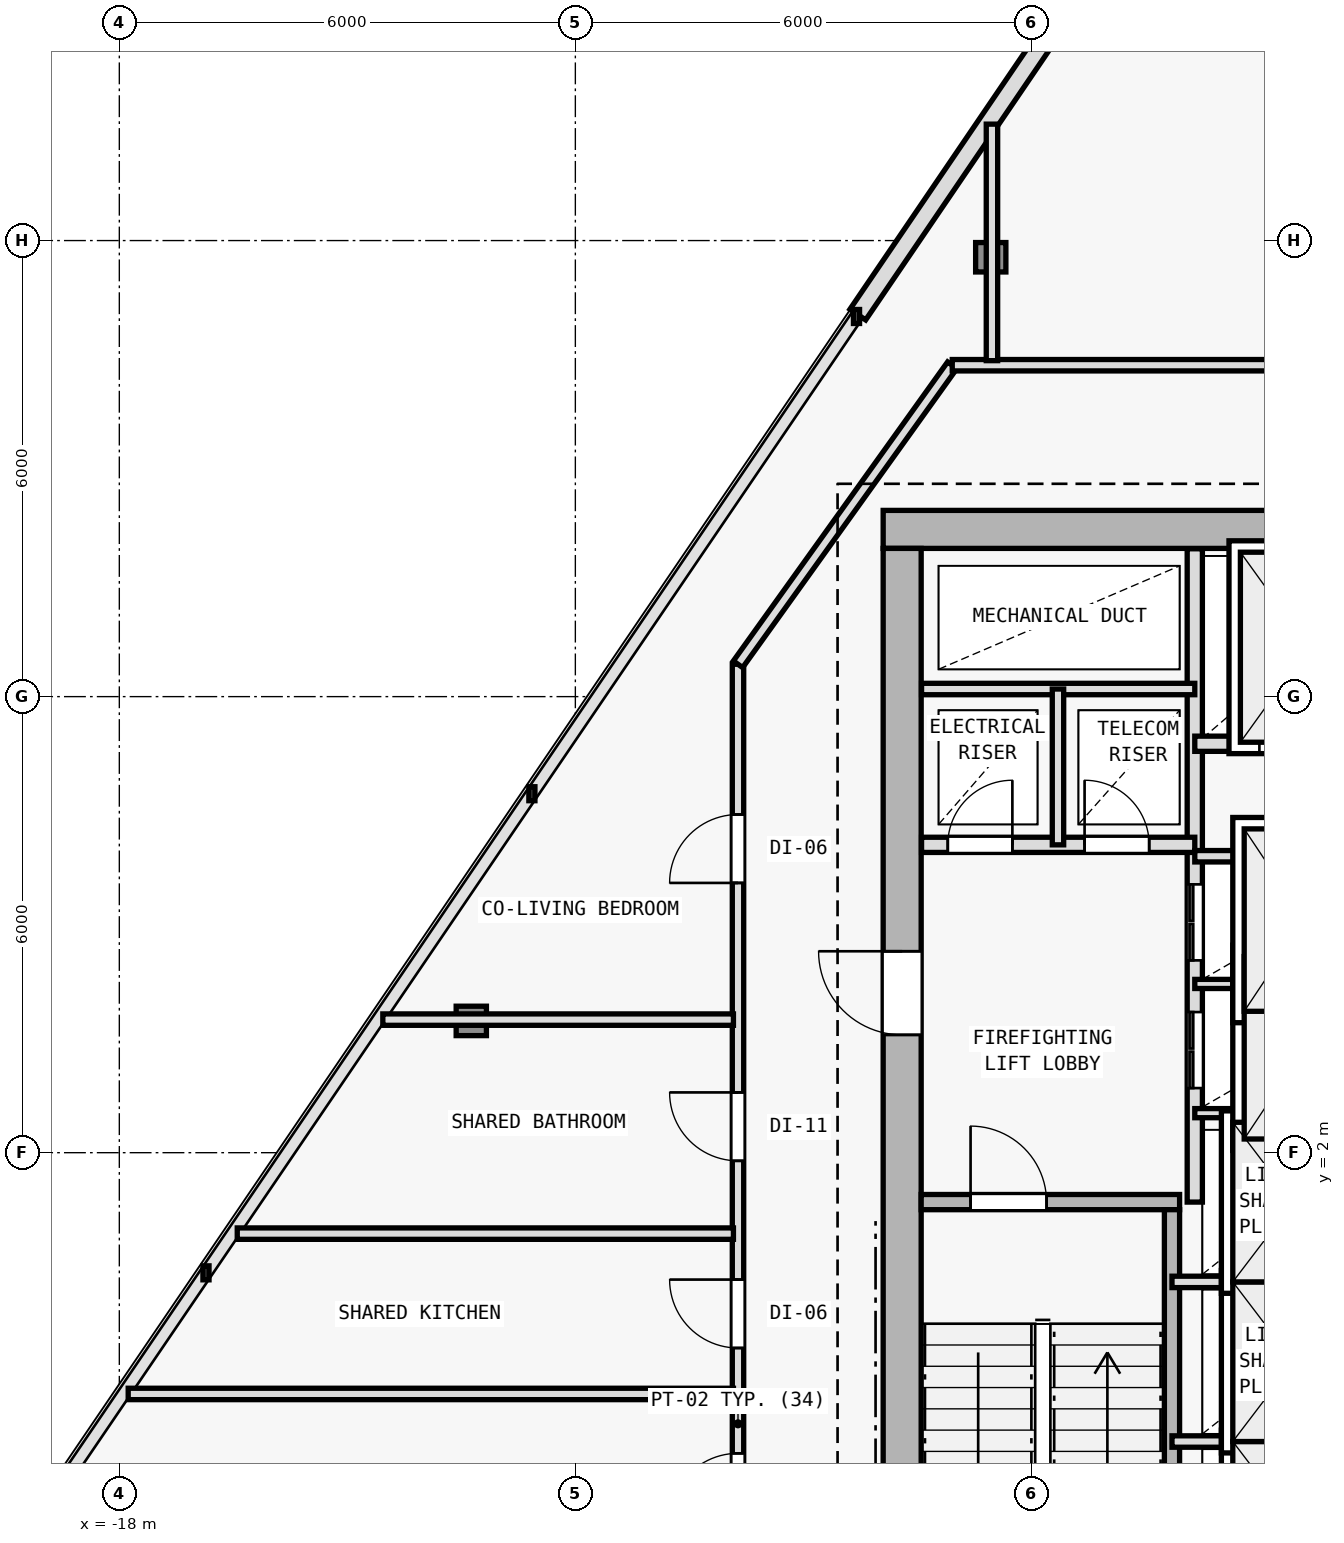
"""IFC4 building model, lengths in metres.
Left out: names, types, materials, properties, quantities, classifications, styles, units other than length and angle.
Written with IfcOpenShell. Run it as: python <this file> out.ifc"""

import sys

from ifc_helpers import new_model, si_unit, direction, frame, frame_2d, origin, origin_2d, place, context, subcontext, project, spatial, rectangle, i_section, extrude, element, fill, save


model = new_model("IFC4")
c1 = context("Model", 3, precision=1e-05, world=origin(), true_north=direction((0.0, 1.0)))
c2 = subcontext(c1, "Body", "Model", "MODEL_VIEW")
j1 = project(units=[si_unit("LENGTHUNIT", "METRE"), si_unit("PLANEANGLEUNIT", "RADIAN")], contexts=[c1])
p1 = place(None, origin())
s1 = spatial("IfcSite", under=j1, at=p1, CompositionType="ELEMENT")
p2 = place(p1, origin())
s2 = spatial("IfcBuilding", under=s1, at=p2, CompositionType="ELEMENT")
p3 = place(p2, frame((0.0, 0.0, 198.3)))
s3 = spatial("IfcBuildingStorey", under=s2, at=p3, CompositionType="ELEMENT", Elevation=198.3)
for number, where, z_axis, x_axis in (
    (1, (-7.7, 10.2, 0.0), (0.0, 0.0, 1.0), (1.0, 0.0, 0.0)),
    (2, (-7.7, 2.0, 0.0), (0.0, 0.0, 1.0), (1.0, 0.0, 0.0)),
):
    element("IfcColumn", number, at=place(p3, frame(where, z_axis=z_axis, x_axis=x_axis)), inside=s3, PredefinedType="COLUMN", context=c2, shape_type="SweptSolid", body=[
        extrude(i_section(OverallWidth=0.398, OverallDepth=0.387, WebThickness=0.013, FlangeThickness=0.022, FilletRadius=0.015, at=origin_2d()), origin(), (0.0, 0.0, 1.0), 3.6),
    ])
p4 = place(p3, frame((-6.534, 13.781, 0.005), z_axis=(0.008774546149, -0.002584750028, 0.999958162328), x_axis=(0.282568886397, 0.959247009086, 0.0)))
e3 = element("IfcColumn", 3, at=p4, inside=s3, PredefinedType="COLUMN", context=c2, shape_type="SweptSolid", body=[
    extrude(i_section(OverallWidth=0.398, OverallDepth=0.387, WebThickness=0.013, FlangeThickness=0.022, FilletRadius=0.015, at=origin_2d()), origin(), (0.0, 0.0, 1.0), 3.589),
])
p5 = place(p3, frame((-13.369, 3.734, 0.005), z_axis=(0.01700241672, 0.009521353363, 0.999810112799), x_axis=(-0.488603368932, 0.87250601595, 0.0)))
e4 = element("IfcColumn", 4, at=p5, inside=s3, PredefinedType="COLUMN", context=c2, shape_type="SweptSolid", body=[
    extrude(i_section(OverallWidth=0.398, OverallDepth=0.387, WebThickness=0.013, FlangeThickness=0.022, FilletRadius=0.015, at=origin_2d()), origin(), (0.0, 0.0, 1.0), 3.59),
])
p6 = place(p3, frame((-8.284, 13.026, 0.0), z_axis=(0.0, 0.0, 1.0), x_axis=(0.562468945091, 0.826818411629, 0.0)))
e5 = element("IfcWall", 5, at=p6, inside=s3, PredefinedType="SOLIDWALL", context=c2, shape_type="SweptSolid", body=[
    extrude(rectangle(XDim=10.714, YDim=0.25, at=frame_2d((5.357, 0.0))), origin(), (0.0, 0.0, 1.0), 3.35),
])
p7 = place(p6, frame((4.607, 0.0, 0.62)))
e6 = element("IfcOpeningElement", 6, at=p7, cuts=e5, PredefinedType="OPENING", context=c2, shape_type="SweptSolid", body=[
    extrude(rectangle(XDim=1.5, YDim=2.0, at=frame_2d((0.75, 1.0))), frame((0.0, 0.135, 0.0), z_axis=(0.0, -1.0, 0.0), x_axis=(1.0, 0.0, 0.0)), (0.0, 0.0, 1.0), 0.27),
])
p8 = place(p3, frame((7.95, 10.2, 0.0), z_axis=(0.0, 0.0, 1.0), x_axis=(-1.0, 0.0, 0.0)))
e7 = element("IfcWall", 7, at=p8, inside=s3, PredefinedType="SHEAR", context=c2, shape_type="SweptSolid", body=[
    extrude(rectangle(XDim=15.9, YDim=0.5, at=frame_2d((7.95, 0.0))), origin(), (0.0, 0.0, 1.0), 3.35),
])
p9 = place(p8, frame((4.4, 0.0, 0.0)))
e8 = element("IfcOpeningElement", 8, at=p9, cuts=e7, PredefinedType="OPENING", context=c2, shape_type="SweptSolid", body=[
    extrude(rectangle(XDim=1.1, YDim=2.15, at=frame_2d((0.55, 1.075))), frame((0.0, 0.26, 0.0), z_axis=(0.0, -1.0, 0.0), x_axis=(1.0, 0.0, 0.0)), (0.0, 0.0, 1.0), 0.52),
])
p10 = place(p3, frame((-7.7, -9.15, 0.0), z_axis=(0.0, 0.0, 1.0), x_axis=(0.0, 1.0, 0.0)))
e9 = element("IfcWall", 9, at=p10, inside=s3, PredefinedType="SHEAR", context=c2, shape_type="SweptSolid", body=[
    extrude(rectangle(XDim=19.1, YDim=0.5, at=frame_2d((9.55, 0.0))), origin(), (0.0, 0.0, 1.0), 3.35),
])
p11 = place(p10, frame((12.7, 0.0, 0.0)))
e10 = element("IfcOpeningElement", 10, at=p11, cuts=e9, PredefinedType="OPENING", context=c2, shape_type="SweptSolid", body=[
    extrude(rectangle(XDim=1.1, YDim=2.15, at=frame_2d((0.55, 1.075))), frame((0.0, 0.26, 0.0), z_axis=(0.0, -1.0, 0.0), x_axis=(1.0, 0.0, 0.0)), (0.0, 0.0, 1.0), 0.52),
])
p12 = place(p3, frame((-7.45, 1.35, 0.0), z_axis=(0.0, 0.0, 1.0), x_axis=(1.0, 0.0, 0.0)))
e11 = element("IfcWall", 11, at=p12, inside=s3, PredefinedType="SOLIDWALL", context=c2, shape_type="SweptSolid", body=[
    extrude(rectangle(XDim=3.4, YDim=0.2, at=frame_2d((1.7, 0.0))), origin(), (0.0, 0.0, 1.0), 3.35),
])
p13 = place(p12, frame((0.65, 0.0, 0.0)))
e12 = element("IfcOpeningElement", 12, at=p13, cuts=e11, PredefinedType="OPENING", context=c2, shape_type="SweptSolid", body=[
    extrude(rectangle(XDim=1.0, YDim=2.15, at=frame_2d((0.5, 1.075))), frame((0.0, 0.11, 0.0), z_axis=(0.0, -1.0, 0.0), x_axis=(1.0, 0.0, 0.0)), (0.0, 0.0, 1.0), 0.22),
])
p14 = place(p3, frame((-4.15, -5.95, 0.0), z_axis=(0.0, 0.0, 1.0), x_axis=(0.0, 1.0, 0.0)))
e13 = element("IfcWall", 13, at=p14, inside=s3, PredefinedType="SOLIDWALL", context=c2, shape_type="SweptSolid", body=[
    extrude(rectangle(XDim=7.2, YDim=0.2, at=frame_2d((3.6, 0.0))), origin(), (0.0, 0.0, 1.0), 3.35),
])
p15 = place(p3, frame((-3.85, 1.35, 0.0), z_axis=(0.0, 0.0, 1.0), x_axis=(0.0, 1.0, 0.0)))
e14 = element("IfcWall", 14, at=p15, inside=s3, PredefinedType="SOLIDWALL", context=c2, shape_type="SweptSolid", body=[
    extrude(rectangle(XDim=8.595, YDim=0.2, at=frame_2d((4.297, 0.0))), origin(), (0.0, 0.0, 1.0), 3.35),
])
p16 = place(p15, frame((1.5, 0.0, 0.0)))
e15 = element("IfcOpeningElement", 15, at=p16, cuts=e14, PredefinedType="OPENING", context=c2, shape_type="SweptSolid", body=[
    extrude(rectangle(XDim=1.0, YDim=2.15, at=frame_2d((0.5, 1.075))), frame((0.0, 0.11, 0.0), z_axis=(0.0, -1.0, 0.0), x_axis=(1.0, 0.0, 0.0)), (0.0, 0.0, 1.0), 0.22),
])
p17 = place(p15, frame((3.18, 0.0, 0.0)))
e16 = element("IfcOpeningElement", 16, at=p17, cuts=e14, PredefinedType="OPENING", context=c2, shape_type="SweptSolid", body=[
    extrude(rectangle(XDim=1.0, YDim=2.15, at=frame_2d((0.5, 1.075))), frame((0.0, 0.11, 0.0), z_axis=(0.0, -1.0, 0.0), x_axis=(1.0, 0.0, 0.0)), (0.0, 0.0, 1.0), 0.22),
])
p18 = place(p3, frame((-7.445, 6.05, 0.0), z_axis=(0.0, 0.0, 1.0), x_axis=(1.0, 0.0, 0.0)))
e17 = element("IfcWall", 17, at=p18, inside=s3, PredefinedType="SOLIDWALL", context=c2, shape_type="SweptSolid", body=[
    extrude(rectangle(XDim=3.595, YDim=0.2, at=frame_2d((1.797, 0.0))), origin(), (0.0, 0.0, 1.0), 3.35),
])
p19 = place(p18, frame((0.345, 0.0, 0.0)))
e18 = element("IfcOpeningElement", 18, at=p19, cuts=e17, PredefinedType="OPENING", context=c2, shape_type="SweptSolid", body=[
    extrude(rectangle(XDim=0.85, YDim=2.1, at=frame_2d((0.425, 1.05))), frame((0.0, 0.11, 0.0), z_axis=(0.0, -1.0, 0.0), x_axis=(1.0, 0.0, 0.0)), (0.0, 0.0, 1.0), 0.22),
])
p20 = place(p18, frame((2.145, 0.0, 0.0)))
e19 = element("IfcOpeningElement", 19, at=p20, cuts=e17, PredefinedType="OPENING", context=c2, shape_type="SweptSolid", body=[
    extrude(rectangle(XDim=0.85, YDim=2.1, at=frame_2d((0.425, 1.05))), frame((0.0, 0.11, 0.0), z_axis=(0.0, -1.0, 0.0), x_axis=(1.0, 0.0, 0.0)), (0.0, 0.0, 1.0), 0.22),
])
p21 = place(p3, frame((-7.445, 8.1, 0.0), z_axis=(0.0, 0.0, 1.0), x_axis=(1.0, 0.0, 0.0)))
e20 = element("IfcWall", 20, at=p21, inside=s3, PredefinedType="PARTITIONING", context=c2, shape_type="SweptSolid", body=[
    extrude(rectangle(XDim=3.595, YDim=0.15, at=frame_2d((1.797, 0.0))), origin(), (0.0, 0.0, 1.0), 3.35),
])
p22 = place(p3, frame((-5.65, 6.05, 0.0), z_axis=(0.0, 0.0, 1.0), x_axis=(0.0, 1.0, 0.0)))
e21 = element("IfcWall", 21, at=p22, inside=s3, PredefinedType="PARTITIONING", context=c2, shape_type="SweptSolid", body=[
    extrude(rectangle(XDim=2.05, YDim=0.15, at=frame_2d((1.025, 0.0))), origin(), (0.0, 0.0, 1.0), 3.35),
])
for number, where, z_axis, x_axis in (
    (22, (-3.85, 2.52, 0.0), (0.0, 0.0, 1.0), (1.0, 0.0, 0.0)),
    (23, (-3.85, 4.22, 0.0), (0.0, 0.0, 1.0), (1.0, 0.0, 0.0)),
):
    element("IfcWall", number, at=place(p3, frame(where, z_axis=z_axis, x_axis=x_axis)), inside=s3, PredefinedType="PARTITIONING", context=c2, shape_type="SweptSolid", body=[
        extrude(rectangle(XDim=2.9, YDim=0.12, at=frame_2d((1.45, 0.0))), origin(), (0.0, 0.0, 1.0), 3.35),
    ])
p23 = place(p3, frame((-3.85, 5.9, 0.0), z_axis=(0.0, 0.0, 1.0), x_axis=(1.0, 0.0, 0.0)))
e24 = element("IfcWall", 24, at=p23, inside=s3, PredefinedType="PARTITIONING", context=c2, shape_type="SweptSolid", body=[
    extrude(rectangle(XDim=2.9, YDim=0.15, at=frame_2d((1.45, 0.0))), origin(), (0.0, 0.0, 1.0), 3.35),
])
p24 = place(p3, frame((-3.85, 7.38, 0.0), z_axis=(0.0, 0.0, 1.0), x_axis=(1.0, 0.0, 0.0)))
e25 = element("IfcWall", 25, at=p24, inside=s3, PredefinedType="SOLIDWALL", context=c2, shape_type="SweptSolid", body=[
    extrude(rectangle(XDim=2.9, YDim=0.2, at=frame_2d((1.45, 0.0))), origin(), (0.0, 0.0, 1.0), 3.35),
])
p25 = place(p24, frame((0.85, 0.0, 0.0)))
e26 = element("IfcOpeningElement", 26, at=p25, cuts=e25, PredefinedType="OPENING", context=c2, shape_type="SweptSolid", body=[
    extrude(rectangle(XDim=1.2, YDim=2.2, at=frame_2d((0.6, 1.1))), frame((0.0, 0.11, 0.0), z_axis=(0.0, -1.0, 0.0), x_axis=(1.0, 0.0, 0.0)), (0.0, 0.0, 1.0), 0.22),
])
for number, where, z_axis, x_axis in (
    (27, (-4.15, -1.8, 0.0), (0.0, 0.0, 1.0), (1.0, 0.0, 0.0)),
    (28, (-4.15, 0.3, 0.0), (0.0, 0.0, 1.0), (1.0, 0.0, 0.0)),
):
    element("IfcWall", number, at=place(p3, frame(where, z_axis=z_axis, x_axis=x_axis)), inside=s3, PredefinedType="PARTITIONING", context=c2, shape_type="SweptSolid", body=[
        extrude(rectangle(XDim=2.9, YDim=0.15, at=frame_2d((1.45, 0.0))), origin(), (0.0, 0.0, 1.0), 3.35),
    ])
p26 = place(p3, frame((-9.86, -11.56, 0.0), z_axis=(0.0, 0.0, 1.0), x_axis=(0.0, 1.0, 0.0)))
e29 = element("IfcWall", 29, at=p26, inside=s3, PredefinedType="PARTITIONING", context=c2, shape_type="SweptSolid", body=[
    extrude(rectangle(XDim=19.986, YDim=0.15, at=frame_2d((9.993, 0.0))), origin(), (0.0, 0.0, 1.0), 2.725),
])
p27 = place(p26, frame((10.99, 0.0, 0.0)))
e30 = element("IfcOpeningElement", 30, at=p27, cuts=e29, PredefinedType="OPENING", context=c2, shape_type="SweptSolid", body=[
    extrude(rectangle(XDim=0.9, YDim=2.1, at=frame_2d((0.45, 1.05))), frame((0.0, 0.085, 0.0), z_axis=(0.0, -1.0, 0.0), x_axis=(1.0, 0.0, 0.0)), (0.0, 0.0, 1.0), 0.17),
])
p28 = place(p26, frame((8.705, 0.0, 0.0)))
e31 = element("IfcOpeningElement", 31, at=p28, cuts=e29, PredefinedType="OPENING", context=c2, shape_type="SweptSolid", body=[
    extrude(rectangle(XDim=0.9, YDim=2.1, at=frame_2d((0.45, 1.05))), frame((0.0, 0.085, 0.0), z_axis=(0.0, -1.0, 0.0), x_axis=(1.0, 0.0, 0.0)), (0.0, 0.0, 1.0), 0.17),
])
p29 = place(p26, frame((6.155, 0.0, 0.0)))
e32 = element("IfcOpeningElement", 32, at=p29, cuts=e29, PredefinedType="OPENING", context=c2, shape_type="SweptSolid", body=[
    extrude(rectangle(XDim=0.9, YDim=2.1, at=frame_2d((0.45, 1.05))), frame((0.0, 0.085, 0.0), z_axis=(0.0, -1.0, 0.0), x_axis=(1.0, 0.0, 0.0)), (0.0, 0.0, 1.0), 0.17),
])
p30 = place(p26, frame((2.282, 0.0, 0.0)))
e33 = element("IfcOpeningElement", 33, at=p30, cuts=e29, PredefinedType="OPENING", context=c2, shape_type="SweptSolid", body=[
    extrude(rectangle(XDim=0.9, YDim=2.1, at=frame_2d((0.45, 1.05))), frame((0.0, 0.085, 0.0), z_axis=(0.0, -1.0, 0.0), x_axis=(1.0, 0.0, 0.0)), (0.0, 0.0, 1.0), 0.17),
])
p31 = place(p26, frame((17.109, 0.0, 0.0)))
e34 = element("IfcOpeningElement", 34, at=p31, cuts=e29, PredefinedType="OPENING", context=c2, shape_type="SweptSolid", body=[
    extrude(rectangle(XDim=0.9, YDim=2.1, at=frame_2d((0.45, 1.05))), frame((0.0, 0.085, 0.0), z_axis=(0.0, -1.0, 0.0), x_axis=(1.0, 0.0, 0.0)), (0.0, 0.0, 1.0), 0.17),
])
p32 = place(p26, frame((13.453, 0.0, 0.0)))
e35 = element("IfcOpeningElement", 35, at=p32, cuts=e29, PredefinedType="OPENING", context=c2, shape_type="SweptSolid", body=[
    extrude(rectangle(XDim=0.9, YDim=2.1, at=frame_2d((0.45, 1.05))), frame((0.0, 0.085, 0.0), z_axis=(0.0, -1.0, 0.0), x_axis=(1.0, 0.0, 0.0)), (0.0, 0.0, 1.0), 0.17),
])
p33 = place(p3, frame((-9.86, 8.426, 0.0), z_axis=(0.0, 0.0, 1.0), x_axis=(0.582449511476, 0.812866881218, 0.0)))
e36 = element("IfcWall", 36, at=p33, inside=s3, PredefinedType="PARTITIONING", context=c2, shape_type="SweptSolid", body=[
    extrude(rectangle(XDim=4.84, YDim=0.15, at=frame_2d((2.42, 0.0))), origin(), (0.0, 0.0, 1.0), 2.935),
])
p34 = place(p3, frame((-7.041, 12.36, 0.0), z_axis=(0.0, 0.0, 1.0), x_axis=(1.0, 0.0, 0.0)))
e37 = element("IfcWall", 37, at=p34, inside=s3, PredefinedType="PARTITIONING", context=c2, shape_type="SweptSolid", body=[
    extrude(rectangle(XDim=14.064, YDim=0.15, at=frame_2d((7.032, 0.0))), origin(), (0.0, 0.0, 1.0), 3.005),
])
p35 = place(p34, frame((6.754, 0.0, 0.0)))
e38 = element("IfcOpeningElement", 38, at=p35, cuts=e37, PredefinedType="OPENING", context=c2, shape_type="SweptSolid", body=[
    extrude(rectangle(XDim=0.9, YDim=2.1, at=frame_2d((0.45, 1.05))), frame((0.0, 0.085, 0.0), z_axis=(0.0, -1.0, 0.0), x_axis=(1.0, 0.0, 0.0)), (0.0, 0.0, 1.0), 0.17),
])
p36 = place(p3, frame((-6.519, 12.42, 0.0), z_axis=(0.0, 0.0, 1.0), x_axis=(0.0, 1.0, 0.0)))
e39 = element("IfcWall", 39, at=p36, inside=s3, PredefinedType="PARTITIONING", context=c2, shape_type="SweptSolid", body=[
    extrude(rectangle(XDim=3.112, YDim=0.15, at=frame_2d((1.556, 0.0))), origin(), (0.0, 0.0, 1.0), 2.935),
])
p37 = place(p3, frame((-9.92, 3.751, 0.0), z_axis=(0.0, 0.0, 1.0), x_axis=(-1.0, 0.0, 0.0)))
e40 = element("IfcWall", 40, at=p37, inside=s3, PredefinedType="PARTITIONING", context=c2, shape_type="SweptSolid", body=[
    extrude(rectangle(XDim=4.613, YDim=0.15, at=frame_2d((2.307, 0.0))), origin(), (0.0, 0.0, 1.0), 2.935),
])
p38 = place(p3, frame((-9.92, -1.174, 0.0), z_axis=(0.0, 0.0, 1.0), x_axis=(-1.0, 0.0, 0.0)))
e41 = element("IfcWall", 41, at=p38, inside=s3, PredefinedType="PARTITIONING", context=c2, shape_type="SweptSolid", body=[
    extrude(rectangle(XDim=7.963, YDim=0.15, at=frame_2d((3.982, 0.0))), origin(), (0.0, 0.0, 1.0), 2.725),
])
p39 = place(p3, frame((-9.92, 0.935, 0.0), z_axis=(0.0, 0.0, 1.0), x_axis=(-1.0, 0.0, 0.0)))
e42 = element("IfcWall", 42, at=p39, inside=s3, PredefinedType="PARTITIONING", context=c2, shape_type="SweptSolid", body=[
    extrude(rectangle(XDim=6.529, YDim=0.15, at=frame_2d((3.264, 0.0))), origin(), (0.0, 0.0, 1.0), 2.935),
])
p40 = place(p11, origin())
e43 = element("IfcDoor", 43, at=p40, inside=s3, OperationType="SINGLE_SWING_RIGHT", PredefinedType="DOOR", context=c2, shape_type="SweptSolid", body=[
    extrude(rectangle(XDim=1.1, YDim=2.15, at=frame_2d((0.55, 1.075))), frame((0.0, 0.025, 0.0), z_axis=(0.0, -1.0, 0.0), x_axis=(1.0, 0.0, 0.0)), (0.0, 0.0, 1.0), 0.05),
])
fill(e10, e43)
p41 = place(p13, origin())
e44 = element("IfcDoor", 44, at=p41, inside=s3, OperationType="SINGLE_SWING_LEFT", PredefinedType="DOOR", context=c2, shape_type="SweptSolid", body=[
    extrude(rectangle(XDim=1.0, YDim=2.15, at=frame_2d((0.5, 1.075))), frame((0.0, 0.025, 0.0), z_axis=(0.0, -1.0, 0.0), x_axis=(1.0, 0.0, 0.0)), (0.0, 0.0, 1.0), 0.05),
])
fill(e12, e44)
p42 = place(p19, origin())
e45 = element("IfcDoor", 45, at=p42, inside=s3, OperationType="SINGLE_SWING_RIGHT", PredefinedType="DOOR", context=c2, shape_type="SweptSolid", body=[
    extrude(rectangle(XDim=0.85, YDim=2.1, at=frame_2d((0.425, 1.05))), frame((0.0, 0.025, 0.0), z_axis=(0.0, -1.0, 0.0), x_axis=(1.0, 0.0, 0.0)), (0.0, 0.0, 1.0), 0.05),
])
fill(e18, e45)
p43 = place(p20, origin())
e46 = element("IfcDoor", 46, at=p43, inside=s3, OperationType="SINGLE_SWING_LEFT", PredefinedType="DOOR", context=c2, shape_type="SweptSolid", body=[
    extrude(rectangle(XDim=0.85, YDim=2.1, at=frame_2d((0.425, 1.05))), frame((0.0, 0.025, 0.0), z_axis=(0.0, -1.0, 0.0), x_axis=(1.0, 0.0, 0.0)), (0.0, 0.0, 1.0), 0.05),
])
fill(e19, e46)
p44 = place(p25, origin())
e47 = element("IfcDoor", 47, at=p44, inside=s3, OperationType="DOUBLE_DOOR_SLIDING", PredefinedType="DOOR", context=c2, shape_type="SweptSolid", body=[
    extrude(rectangle(XDim=1.2, YDim=2.2, at=frame_2d((0.6, 1.1))), frame((0.0, 0.025, 0.0), z_axis=(0.0, -1.0, 0.0), x_axis=(1.0, 0.0, 0.0)), (0.0, 0.0, 1.0), 0.05),
])
fill(e26, e47)
p45 = place(p16, origin())
e48 = element("IfcDoor", 48, at=p45, inside=s3, OperationType="DOUBLE_DOOR_SLIDING", PredefinedType="DOOR", context=c2, shape_type="SweptSolid", body=[
    extrude(rectangle(XDim=1.0, YDim=2.15, at=frame_2d((0.5, 1.075))), frame((0.0, 0.025, 0.0), z_axis=(0.0, -1.0, 0.0), x_axis=(1.0, 0.0, 0.0)), (0.0, 0.0, 1.0), 0.05),
])
fill(e15, e48)
p46 = place(p17, origin())
e49 = element("IfcDoor", 49, at=p46, inside=s3, OperationType="DOUBLE_DOOR_SLIDING", PredefinedType="DOOR", context=c2, shape_type="SweptSolid", body=[
    extrude(rectangle(XDim=1.0, YDim=2.15, at=frame_2d((0.5, 1.075))), frame((0.0, 0.025, 0.0), z_axis=(0.0, -1.0, 0.0), x_axis=(1.0, 0.0, 0.0)), (0.0, 0.0, 1.0), 0.05),
])
fill(e16, e49)
p47 = place(p27, origin())
e50 = element("IfcDoor", 50, at=p47, inside=s3, OperationType="SINGLE_SWING_RIGHT", PredefinedType="DOOR", context=c2, shape_type="SweptSolid", body=[
    extrude(rectangle(XDim=0.9, YDim=2.1, at=frame_2d((0.45, 1.05))), frame((0.0, 0.025, 0.0), z_axis=(0.0, -1.0, 0.0), x_axis=(1.0, 0.0, 0.0)), (0.0, 0.0, 1.0), 0.05),
])
fill(e30, e50)
p48 = place(p28, origin())
e51 = element("IfcDoor", 51, at=p48, inside=s3, OperationType="SINGLE_SWING_LEFT", PredefinedType="DOOR", context=c2, shape_type="SweptSolid", body=[
    extrude(rectangle(XDim=0.9, YDim=2.1, at=frame_2d((0.45, 1.05))), frame((0.0, 0.025, 0.0), z_axis=(0.0, -1.0, 0.0), x_axis=(1.0, 0.0, 0.0)), (0.0, 0.0, 1.0), 0.05),
])
fill(e31, e51)
p49 = place(p31, origin())
e52 = element("IfcDoor", 52, at=p49, inside=s3, OperationType="SINGLE_SWING_LEFT", PredefinedType="DOOR", context=c2, shape_type="SweptSolid", body=[
    extrude(rectangle(XDim=0.9, YDim=2.1, at=frame_2d((0.45, 1.05))), frame((0.0, 0.025, 0.0), z_axis=(0.0, -1.0, 0.0), x_axis=(1.0, 0.0, 0.0)), (0.0, 0.0, 1.0), 0.05),
])
fill(e34, e52)
p50 = place(p32, origin())
e53 = element("IfcDoor", 53, at=p50, inside=s3, OperationType="SINGLE_SWING_RIGHT", PredefinedType="DOOR", context=c2, shape_type="SweptSolid", body=[
    extrude(rectangle(XDim=0.9, YDim=2.1, at=frame_2d((0.45, 1.05))), frame((0.0, 0.025, 0.0), z_axis=(0.0, -1.0, 0.0), x_axis=(1.0, 0.0, 0.0)), (0.0, 0.0, 1.0), 0.05),
])
fill(e35, e53)
save(model, sys.argv[1])
